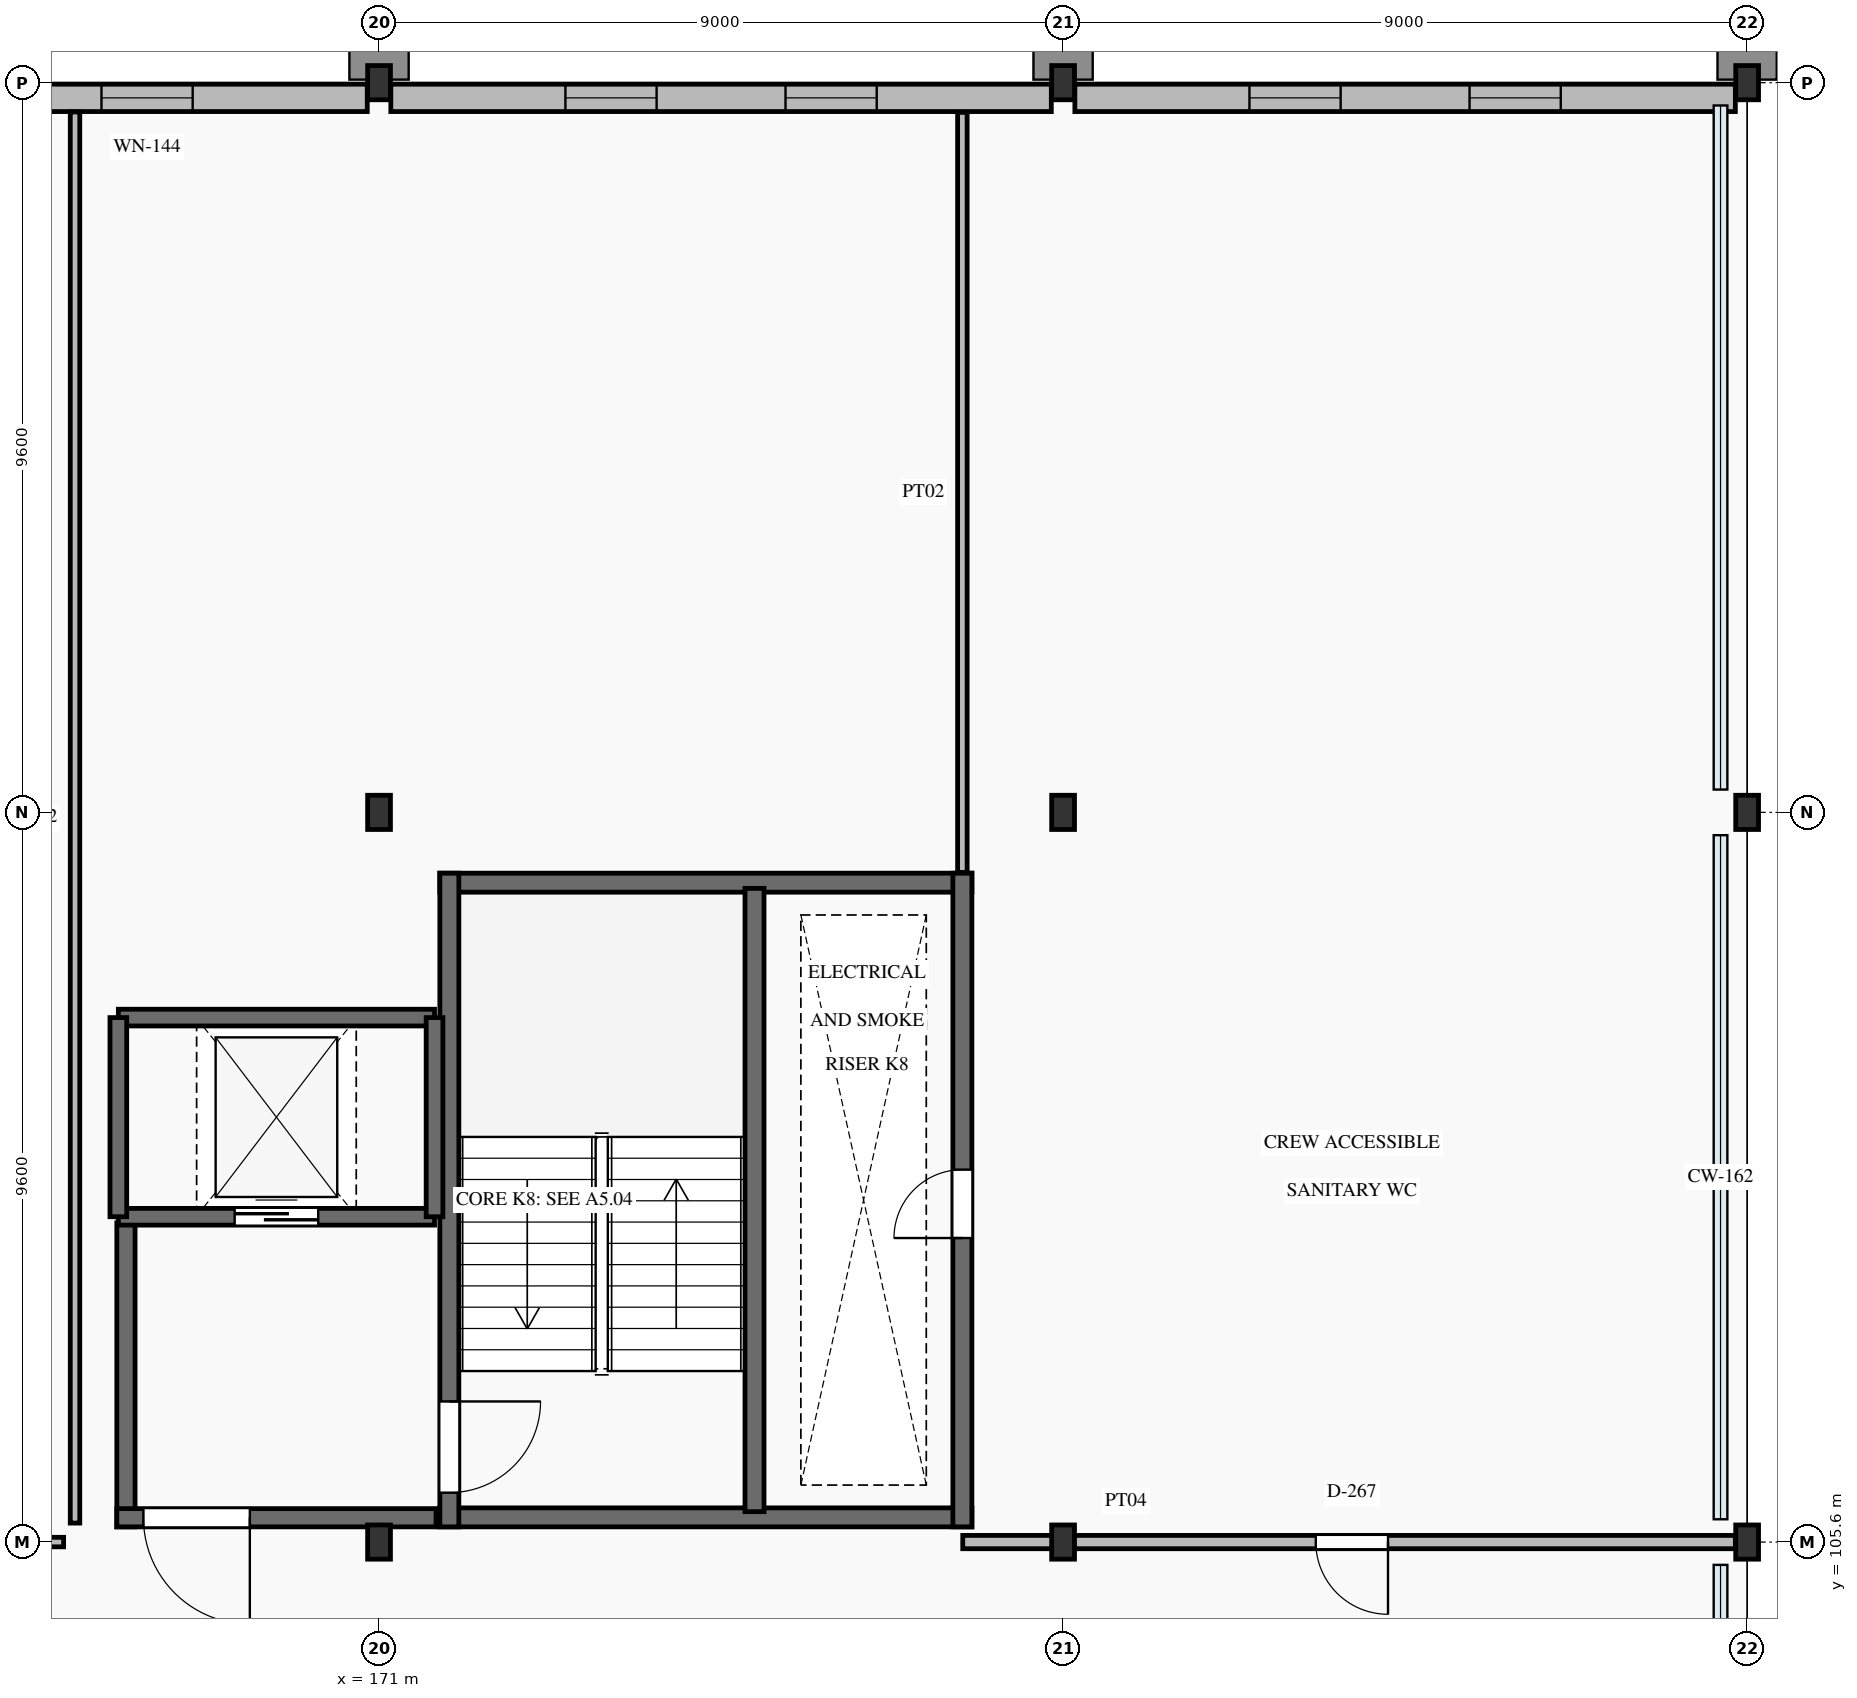
"""IFC4 building model, lengths in metres.
Left out: names, types, materials, properties, quantities, classifications, styles, units other than length and angle.
Written with IfcOpenShell. Run it as: python <this file> out.ifc"""

import sys

from ifc_helpers import new_model, si_unit, direction, frame, frame_2d, origin, origin_2d, place, context, subcontext, project, spatial, rectangle, i_section, extrude, element, fill, save


model = new_model("IFC4")
c1 = context("Model", 3, precision=1e-05, world=origin(), true_north=direction((0.0, 1.0)))
c2 = subcontext(c1, "Body", "Model", "MODEL_VIEW")
j1 = project(units=[si_unit("LENGTHUNIT", "METRE"), si_unit("PLANEANGLEUNIT", "RADIAN")], contexts=[c1])
p1 = place(None, origin())
s1 = spatial("IfcSite", under=j1, at=p1, CompositionType="ELEMENT")
p2 = place(p1, origin())
s2 = spatial("IfcBuilding", under=s1, at=p2, CompositionType="ELEMENT")
p3 = place(p2, frame((0.0, 0.0, 10.8)))
s3 = spatial("IfcBuildingStorey", under=s2, at=p3, CompositionType="ELEMENT", Elevation=10.8)
for number, where, z_axis, x_axis in (
    (1, (171.0, 105.6, 0.0), (0.0, 0.0, 1.0), (1.0, 0.0, 0.0)),
    (2, (171.0, 115.2, 0.0), (0.0, 0.0, 1.0), (1.0, 0.0, 0.0)),
    (3, (171.0, 124.8, 0.0), (0.0, 0.0, 1.0), (1.0, 0.0, 0.0)),
    (4, (180.0, 105.6, 0.0), (0.0, 0.0, 1.0), (1.0, 0.0, 0.0)),
    (5, (180.0, 115.2, 0.0), (0.0, 0.0, 1.0), (1.0, 0.0, 0.0)),
    (6, (180.0, 124.8, 0.0), (0.0, 0.0, 1.0), (1.0, 0.0, 0.0)),
    (7, (189.0, 105.6, 0.0), (0.0, 0.0, 1.0), (1.0, 0.0, 0.0)),
    (8, (189.0, 115.2, 0.0), (0.0, 0.0, 1.0), (1.0, 0.0, 0.0)),
    (9, (189.0, 124.8, 0.0), (0.0, 0.0, 1.0), (1.0, 0.0, 0.0)),
):
    element("IfcColumn", number, at=place(p3, frame(where, z_axis=z_axis, x_axis=x_axis)), inside=s3, PredefinedType="COLUMN", context=c2, shape_type="SweptSolid", body=[
        extrude(i_section(OverallWidth=0.3, OverallDepth=0.45, WebThickness=0.014, FlangeThickness=0.026, FilletRadius=0.027, at=origin_2d()), origin(), (0.0, 0.0, 1.0), 4.2),
    ])
p4 = place(p3, frame((162.155, 124.6, 0.0), z_axis=(0.0, 0.0, 1.0), x_axis=(1.0, 0.0, 0.0)))
e10 = element("IfcWall", 10, at=p4, inside=s3, PredefinedType="SOLIDWALL", context=c2, shape_type="SweptSolid", body=[
    extrude(rectangle(XDim=8.69, YDim=0.36, at=frame_2d((4.345, 0.0))), origin(), (0.0, 0.0, 1.0), 3.69),
])
p5 = place(p4, frame((2.297, 0.0, 0.95)))
e11 = element("IfcOpeningElement", 11, at=p5, cuts=e10, PredefinedType="OPENING", context=c2, shape_type="SweptSolid", body=[
    extrude(rectangle(XDim=1.2, YDim=1.8, at=frame_2d((0.6, 0.9))), frame((0.0, 0.195, 0.0), z_axis=(0.0, -1.0, 0.0), x_axis=(1.0, 0.0, 0.0)), (0.0, 0.0, 1.0), 0.39),
])
p6 = place(p4, frame((5.193, 0.0, 0.95)))
e12 = element("IfcOpeningElement", 12, at=p6, cuts=e10, PredefinedType="OPENING", context=c2, shape_type="SweptSolid", body=[
    extrude(rectangle(XDim=1.2, YDim=1.8, at=frame_2d((0.6, 0.9))), frame((0.0, 0.195, 0.0), z_axis=(0.0, -1.0, 0.0), x_axis=(1.0, 0.0, 0.0)), (0.0, 0.0, 1.0), 0.39),
])
p7 = place(p3, frame((171.155, 124.6, 0.0), z_axis=(0.0, 0.0, 1.0), x_axis=(1.0, 0.0, 0.0)))
e13 = element("IfcWall", 13, at=p7, inside=s3, PredefinedType="SOLIDWALL", context=c2, shape_type="SweptSolid", body=[
    extrude(rectangle(XDim=8.69, YDim=0.36, at=frame_2d((4.345, 0.0))), origin(), (0.0, 0.0, 1.0), 3.69),
])
p8 = place(p7, frame((2.297, 0.0, 0.95)))
e14 = element("IfcOpeningElement", 14, at=p8, cuts=e13, PredefinedType="OPENING", context=c2, shape_type="SweptSolid", body=[
    extrude(rectangle(XDim=1.2, YDim=1.8, at=frame_2d((0.6, 0.9))), frame((0.0, 0.195, 0.0), z_axis=(0.0, -1.0, 0.0), x_axis=(1.0, 0.0, 0.0)), (0.0, 0.0, 1.0), 0.39),
])
p9 = place(p7, frame((5.193, 0.0, 0.95)))
e15 = element("IfcOpeningElement", 15, at=p9, cuts=e13, PredefinedType="OPENING", context=c2, shape_type="SweptSolid", body=[
    extrude(rectangle(XDim=1.2, YDim=1.8, at=frame_2d((0.6, 0.9))), frame((0.0, 0.195, 0.0), z_axis=(0.0, -1.0, 0.0), x_axis=(1.0, 0.0, 0.0)), (0.0, 0.0, 1.0), 0.39),
])
p10 = place(p3, frame((180.155, 124.6, 0.0), z_axis=(0.0, 0.0, 1.0), x_axis=(1.0, 0.0, 0.0)))
e16 = element("IfcWall", 16, at=p10, inside=s3, PredefinedType="SOLIDWALL", context=c2, shape_type="SweptSolid", body=[
    extrude(rectangle(XDim=8.69, YDim=0.36, at=frame_2d((4.345, 0.0))), origin(), (0.0, 0.0, 1.0), 3.69),
])
p11 = place(p10, frame((2.297, 0.0, 0.95)))
e17 = element("IfcOpeningElement", 17, at=p11, cuts=e16, PredefinedType="OPENING", context=c2, shape_type="SweptSolid", body=[
    extrude(rectangle(XDim=1.2, YDim=1.8, at=frame_2d((0.6, 0.9))), frame((0.0, 0.195, 0.0), z_axis=(0.0, -1.0, 0.0), x_axis=(1.0, 0.0, 0.0)), (0.0, 0.0, 1.0), 0.39),
])
p12 = place(p10, frame((5.193, 0.0, 0.95)))
e18 = element("IfcOpeningElement", 18, at=p12, cuts=e16, PredefinedType="OPENING", context=c2, shape_type="SweptSolid", body=[
    extrude(rectangle(XDim=1.2, YDim=1.8, at=frame_2d((0.6, 0.9))), frame((0.0, 0.195, 0.0), z_axis=(0.0, -1.0, 0.0), x_axis=(1.0, 0.0, 0.0)), (0.0, 0.0, 1.0), 0.39),
])
for number, where, z_axis, x_axis in (
    (19, (171.8, 105.925, 0.0), (0.0, 0.0, 1.0), (1.0, 0.0, 0.0)),
    (20, (171.8, 114.275, 0.0), (0.0, 0.0, 1.0), (1.0, 0.0, 0.0)),
):
    element("IfcWall", number, at=place(p3, frame(where, z_axis=z_axis, x_axis=x_axis)), inside=s3, PredefinedType="SHEAR", context=c2, shape_type="SweptSolid", body=[
        extrude(rectangle(XDim=7.0, YDim=0.25, at=frame_2d((3.5, 0.0))), origin(), (0.0, 0.0, 1.0), 4.2),
    ])
p13 = place(p3, frame((171.925, 105.8, 0.0), z_axis=(0.0, 0.0, 1.0), x_axis=(0.0, 1.0, 0.0)))
e21 = element("IfcWall", 21, at=p13, inside=s3, PredefinedType="SHEAR", context=c2, shape_type="SweptSolid", body=[
    extrude(rectangle(XDim=8.6, YDim=0.25, at=frame_2d((4.3, 0.0))), origin(), (0.0, 0.0, 1.0), 4.2),
])
p14 = place(p13, frame((0.45, 0.0, 0.0)))
e22 = element("IfcOpeningElement", 22, at=p14, cuts=e21, PredefinedType="OPENING", context=c2, shape_type="SweptSolid", body=[
    extrude(rectangle(XDim=1.2, YDim=2.15, at=frame_2d((0.6, 1.075))), frame((0.0, 0.14, 0.0), z_axis=(0.0, -1.0, 0.0), x_axis=(1.0, 0.0, 0.0)), (0.0, 0.0, 1.0), 0.28),
])
p15 = place(p3, frame((178.675, 105.8, 0.0), z_axis=(0.0, 0.0, 1.0), x_axis=(0.0, 1.0, 0.0)))
e23 = element("IfcWall", 23, at=p15, inside=s3, PredefinedType="SHEAR", context=c2, shape_type="SweptSolid", body=[
    extrude(rectangle(XDim=8.6, YDim=0.25, at=frame_2d((4.3, 0.0))), origin(), (0.0, 0.0, 1.0), 4.2),
])
p16 = place(p15, frame((3.8, 0.0, 0.0)))
e24 = element("IfcOpeningElement", 24, at=p16, cuts=e23, PredefinedType="OPENING", context=c2, shape_type="SweptSolid", body=[
    extrude(rectangle(XDim=0.9, YDim=2.05, at=frame_2d((0.45, 1.025))), frame((0.0, 0.14, 0.0), z_axis=(0.0, -1.0, 0.0), x_axis=(1.0, 0.0, 0.0)), (0.0, 0.0, 1.0), 0.28),
])
p17 = place(p3, frame((175.94, 106.0, 0.0), z_axis=(0.0, 0.0, 1.0), x_axis=(0.0, 1.0, 0.0)))
e25 = element("IfcWall", 25, at=p17, inside=s3, PredefinedType="SHEAR", context=c2, shape_type="SweptSolid", body=[
    extrude(rectangle(XDim=8.2, YDim=0.25, at=frame_2d((4.1, 0.0))), origin(), (0.0, 0.0, 1.0), 4.2),
])
p18 = place(p3, frame((167.67, 105.8, 0.0), z_axis=(0.0, 0.0, 1.0), x_axis=(0.0, 1.0, 0.0)))
e26 = element("IfcWall", 26, at=p18, inside=s3, PredefinedType="SHEAR", context=c2, shape_type="SweptSolid", body=[
    extrude(rectangle(XDim=4.0, YDim=0.24, at=frame_2d((2.0, 0.0))), origin(), (0.0, 0.0, 1.0), 4.2),
])
p19 = place(p3, frame((167.55, 105.92, 0.0), z_axis=(0.0, 0.0, 1.0), x_axis=(1.0, 0.0, 0.0)))
e27 = element("IfcWall", 27, at=p19, inside=s3, PredefinedType="SHEAR", context=c2, shape_type="SweptSolid", body=[
    extrude(rectangle(XDim=4.2, YDim=0.24, at=frame_2d((2.1, 0.0))), origin(), (0.0, 0.0, 1.0), 4.2),
])
p20 = place(p19, frame((0.35, 0.0, 0.0)))
e28 = element("IfcOpeningElement", 28, at=p20, cuts=e27, PredefinedType="OPENING", context=c2, shape_type="SweptSolid", body=[
    extrude(rectangle(XDim=1.4, YDim=2.2, at=frame_2d((0.7, 1.1))), frame((0.0, 0.135, 0.0), z_axis=(0.0, -1.0, 0.0), x_axis=(1.0, 0.0, 0.0)), (0.0, 0.0, 1.0), 0.27),
])
p21 = place(p3, frame((167.57, 109.88, 0.0), z_axis=(0.0, 0.0, 1.0), x_axis=(1.0, 0.0, 0.0)))
e29 = element("IfcWall", 29, at=p21, inside=s3, PredefinedType="SHEAR", context=c2, shape_type="SweptSolid", body=[
    extrude(rectangle(XDim=4.16, YDim=0.22, at=frame_2d((2.08, 0.0))), origin(), (0.0, 0.0, 1.0), 4.2),
])
p22 = place(p21, frame((1.53, 0.0, 0.0)))
e30 = element("IfcOpeningElement", 30, at=p22, cuts=e29, PredefinedType="OPENING", context=c2, shape_type="SweptSolid", body=[
    extrude(rectangle(XDim=1.1, YDim=2.15, at=frame_2d((0.55, 1.075))), frame((0.0, 0.125, 0.0), z_axis=(0.0, -1.0, 0.0), x_axis=(1.0, 0.0, 0.0)), (0.0, 0.0, 1.0), 0.25),
])
p23 = place(p3, frame((167.57, 112.5, 0.0), z_axis=(0.0, 0.0, 1.0), x_axis=(1.0, 0.0, 0.0)))
e31 = element("IfcWall", 31, at=p23, inside=s3, PredefinedType="SHEAR", context=c2, shape_type="SweptSolid", body=[
    extrude(rectangle(XDim=4.16, YDim=0.22, at=frame_2d((2.08, 0.0))), origin(), (0.0, 0.0, 1.0), 4.2),
])
for number, where, z_axis, x_axis in (
    (32, (167.57, 109.88, 0.0), (0.0, 0.0, 1.0), (0.0, 1.0, 0.0)),
    (33, (171.73, 109.88, 0.0), (0.0, 0.0, 1.0), (0.0, 1.0, 0.0)),
):
    element("IfcWall", number, at=place(p3, frame(where, z_axis=z_axis, x_axis=x_axis)), inside=s3, PredefinedType="SHEAR", context=c2, shape_type="SweptSolid", body=[
        extrude(rectangle(XDim=2.62, YDim=0.22, at=frame_2d((1.31, 0.0))), origin(), (0.0, 0.0, 1.0), 4.2),
    ])
p24 = place(p3, frame((160.96, 105.6, 0.0), z_axis=(0.0, 0.0, 1.0), x_axis=(1.0, 0.0, 0.0)))
e34 = element("IfcWall", 34, at=p24, inside=s3, PredefinedType="PARTITIONING", context=c2, shape_type="SweptSolid", body=[
    extrude(rectangle(XDim=5.89, YDim=0.125, at=frame_2d((2.945, 0.0))), origin(), (0.0, 0.0, 1.0), 3.5),
])
p25 = place(p24, frame((3.17, 0.0, 0.0)))
e35 = element("IfcOpeningElement", 35, at=p25, cuts=e34, PredefinedType="OPENING", context=c2, shape_type="SweptSolid", body=[
    extrude(rectangle(XDim=0.95, YDim=2.1, at=frame_2d((0.475, 1.05))), frame((0.0, 0.077, 0.0), z_axis=(0.0, -1.0, 0.0), x_axis=(1.0, 0.0, 0.0)), (0.0, 0.0, 1.0), 0.155),
])
p26 = place(p3, frame((178.68, 105.6, 0.0), z_axis=(0.0, 0.0, 1.0), x_axis=(1.0, 0.0, 0.0)))
e36 = element("IfcWall", 36, at=p26, inside=s3, PredefinedType="PARTITIONING", context=c2, shape_type="SweptSolid", body=[
    extrude(rectangle(XDim=10.165, YDim=0.175, at=frame_2d((5.083, 0.0))), origin(), (0.0, 0.0, 1.0), 3.5),
])
p27 = place(p26, frame((4.645, 0.0, 0.0)))
e37 = element("IfcOpeningElement", 37, at=p27, cuts=e36, PredefinedType="OPENING", context=c2, shape_type="SweptSolid", body=[
    extrude(rectangle(XDim=0.95, YDim=2.1, at=frame_2d((0.475, 1.05))), frame((0.0, 0.103, 0.0), z_axis=(0.0, -1.0, 0.0), x_axis=(1.0, 0.0, 0.0)), (0.0, 0.0, 1.0), 0.205),
])
p28 = place(p3, frame((167.0, 105.85, 0.0), z_axis=(0.0, 0.0, 1.0), x_axis=(0.0, 1.0, 0.0)))
e38 = element("IfcWall", 38, at=p28, inside=s3, PredefinedType="PARTITIONING", context=c2, shape_type="SweptSolid", body=[
    extrude(rectangle(XDim=18.565, YDim=0.125, at=frame_2d((9.282, 0.0))), origin(), (0.0, 0.0, 1.0), 3.94),
])
p29 = place(p3, frame((178.675, 114.41, 0.0), z_axis=(0.0, 0.0, 1.0), x_axis=(0.0, 1.0, 0.0)))
e39 = element("IfcWall", 39, at=p29, inside=s3, PredefinedType="PARTITIONING", context=c2, shape_type="SweptSolid", body=[
    extrude(rectangle(XDim=10.0, YDim=0.125, at=frame_2d((5.0, 0.0))), origin(), (0.0, 0.0, 1.0), 3.94),
])
p30 = place(p6, origin())
e40 = element("IfcWindow", 40, at=p30, inside=s3, PartitioningType="SINGLE_PANEL", PredefinedType="WINDOW", context=c2, shape_type="SweptSolid", body=[
    extrude(rectangle(XDim=1.2, YDim=1.8, at=frame_2d((0.6, 0.9))), frame((0.0, 0.03, 0.0), z_axis=(0.0, -1.0, 0.0), x_axis=(1.0, 0.0, 0.0)), (0.0, 0.0, 1.0), 0.06),
])
fill(e12, e40)
p31 = place(p8, origin())
e41 = element("IfcWindow", 41, at=p31, inside=s3, PartitioningType="SINGLE_PANEL", PredefinedType="WINDOW", context=c2, shape_type="SweptSolid", body=[
    extrude(rectangle(XDim=1.2, YDim=1.8, at=frame_2d((0.6, 0.9))), frame((0.0, 0.03, 0.0), z_axis=(0.0, -1.0, 0.0), x_axis=(1.0, 0.0, 0.0)), (0.0, 0.0, 1.0), 0.06),
])
fill(e14, e41)
p32 = place(p9, origin())
e42 = element("IfcWindow", 42, at=p32, inside=s3, PartitioningType="SINGLE_PANEL", PredefinedType="WINDOW", context=c2, shape_type="SweptSolid", body=[
    extrude(rectangle(XDim=1.2, YDim=1.8, at=frame_2d((0.6, 0.9))), frame((0.0, 0.03, 0.0), z_axis=(0.0, -1.0, 0.0), x_axis=(1.0, 0.0, 0.0)), (0.0, 0.0, 1.0), 0.06),
])
fill(e15, e42)
p33 = place(p11, origin())
e43 = element("IfcWindow", 43, at=p33, inside=s3, PartitioningType="SINGLE_PANEL", PredefinedType="WINDOW", context=c2, shape_type="SweptSolid", body=[
    extrude(rectangle(XDim=1.2, YDim=1.8, at=frame_2d((0.6, 0.9))), frame((0.0, 0.03, 0.0), z_axis=(0.0, -1.0, 0.0), x_axis=(1.0, 0.0, 0.0)), (0.0, 0.0, 1.0), 0.06),
])
fill(e17, e43)
p34 = place(p12, origin())
e44 = element("IfcWindow", 44, at=p34, inside=s3, PartitioningType="SINGLE_PANEL", PredefinedType="WINDOW", context=c2, shape_type="SweptSolid", body=[
    extrude(rectangle(XDim=1.2, YDim=1.8, at=frame_2d((0.6, 0.9))), frame((0.0, 0.03, 0.0), z_axis=(0.0, -1.0, 0.0), x_axis=(1.0, 0.0, 0.0)), (0.0, 0.0, 1.0), 0.06),
])
fill(e18, e44)
p35 = place(p14, frame((1.2, 0.0, 0.0), z_axis=(0.0, 0.0, 1.0), x_axis=(-1.0, 0.0, 0.0)))
e45 = element("IfcDoor", 45, at=p35, inside=s3, OperationType="SINGLE_SWING_RIGHT", PredefinedType="DOOR", context=c2, shape_type="SweptSolid", body=[
    extrude(rectangle(XDim=1.2, YDim=2.15, at=frame_2d((0.6, 1.075))), frame((0.0, 0.025, 0.0), z_axis=(0.0, -1.0, 0.0), x_axis=(1.0, 0.0, 0.0)), (0.0, 0.0, 1.0), 0.05),
])
fill(e22, e45)
p36 = place(p16, origin())
e46 = element("IfcDoor", 46, at=p36, inside=s3, OperationType="SINGLE_SWING_LEFT", PredefinedType="DOOR", context=c2, shape_type="SweptSolid", body=[
    extrude(rectangle(XDim=0.9, YDim=2.05, at=frame_2d((0.45, 1.025))), frame((0.0, 0.025, 0.0), z_axis=(0.0, -1.0, 0.0), x_axis=(1.0, 0.0, 0.0)), (0.0, 0.0, 1.0), 0.05),
])
fill(e24, e46)
p37 = place(p20, frame((1.4, 0.0, 0.0), z_axis=(0.0, 0.0, 1.0), x_axis=(-1.0, 0.0, 0.0)))
e47 = element("IfcDoor", 47, at=p37, inside=s3, OperationType="SINGLE_SWING_RIGHT", PredefinedType="DOOR", context=c2, shape_type="SweptSolid", body=[
    extrude(rectangle(XDim=1.4, YDim=2.2, at=frame_2d((0.7, 1.1))), frame((0.0, 0.025, 0.0), z_axis=(0.0, -1.0, 0.0), x_axis=(1.0, 0.0, 0.0)), (0.0, 0.0, 1.0), 0.05),
])
fill(e28, e47)
p38 = place(p22, origin())
e48 = element("IfcDoor", 48, at=p38, inside=s3, OperationType="SLIDING_TO_LEFT", PredefinedType="DOOR", context=c2, shape_type="SweptSolid", body=[
    extrude(rectangle(XDim=1.1, YDim=2.15, at=frame_2d((0.55, 1.075))), frame((0.0, 0.025, 0.0), z_axis=(0.0, -1.0, 0.0), x_axis=(1.0, 0.0, 0.0)), (0.0, 0.0, 1.0), 0.05),
])
fill(e30, e48)
p39 = place(p27, frame((0.95, 0.0, 0.0), z_axis=(0.0, 0.0, 1.0), x_axis=(-1.0, 0.0, 0.0)))
e49 = element("IfcDoor", 49, at=p39, inside=s3, OperationType="SINGLE_SWING_RIGHT", PredefinedType="DOOR", context=c2, shape_type="SweptSolid", body=[
    extrude(rectangle(XDim=0.95, YDim=2.1, at=frame_2d((0.475, 1.05))), frame((0.0, 0.025, 0.0), z_axis=(0.0, -1.0, 0.0), x_axis=(1.0, 0.0, 0.0)), (0.0, 0.0, 1.0), 0.05),
])
fill(e37, e49)
save(model, sys.argv[1])
